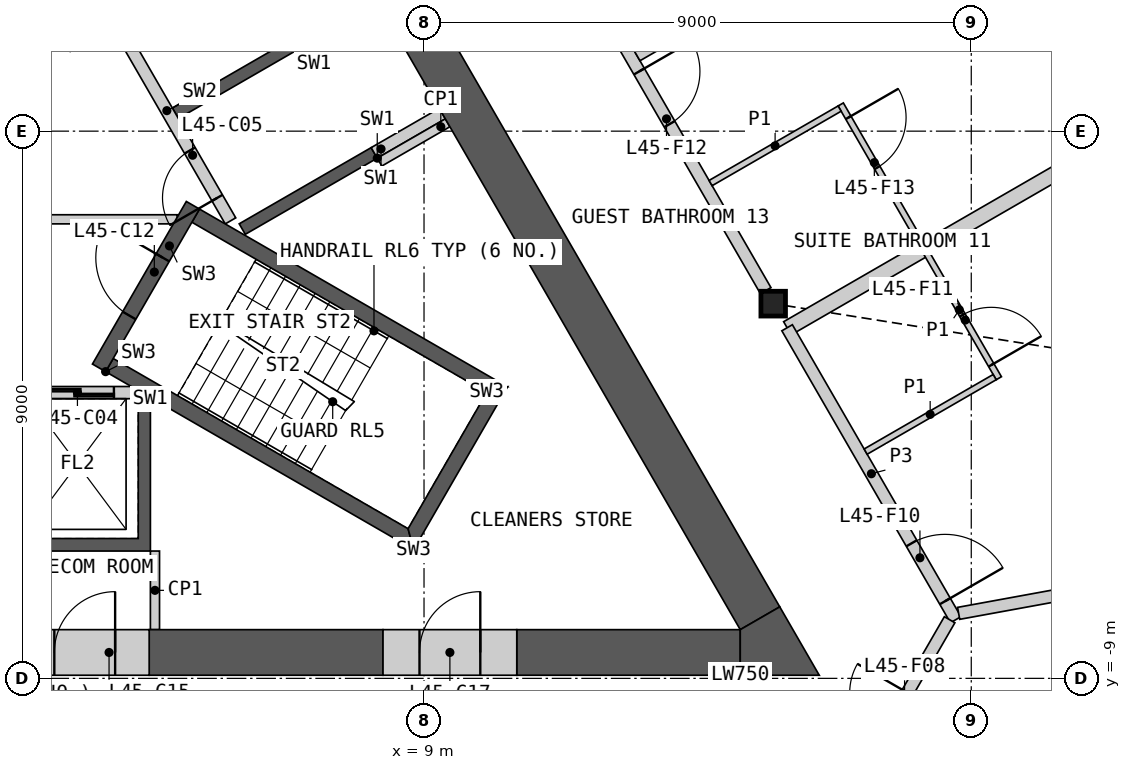
"""IFC4 building model, lengths in metres.
Left out: names, types, materials, properties, quantities, classifications, styles, units other than length and angle.
Written with IfcOpenShell. Run it as: python <this file> out.ifc"""

import sys

from ifc_helpers import new_model, si_unit, direction, frame, frame_2d, origin, origin_2d, place, context, subcontext, project, spatial, polyline, rectangle, i_section, outline, extrude, element, fill, save


model = new_model("IFC4")
c1 = context("Model", 3, precision=1e-05, world=origin(), true_north=direction((0.0, 1.0)))
c2 = subcontext(c1, "Body", "Model", "MODEL_VIEW")
j1 = project(units=[si_unit("LENGTHUNIT", "METRE"), si_unit("PLANEANGLEUNIT", "RADIAN")], contexts=[c1])
p1 = place(None, origin())
s1 = spatial("IfcSite", under=j1, at=p1, CompositionType="ELEMENT")
p2 = place(p1, origin())
s2 = spatial("IfcBuilding", under=s1, at=p2, CompositionType="ELEMENT")
p3 = place(p2, frame((0.0, 0.0, 205.2)))
s3 = spatial("IfcBuildingStorey", under=s2, at=p3, CompositionType="ELEMENT", Elevation=205.2)
p4 = place(p3, frame((14.743, -2.837, 0.0), z_axis=(0.0, 0.0, 1.0), x_axis=(1.0, 0.0, 0.0)))
e1 = element("IfcColumn", 1, at=p4, inside=s3, PredefinedType="COLUMN", context=c2, shape_type="SweptSolid", body=[
    extrude(i_section(OverallWidth=0.404, OverallDepth=0.407, WebThickness=0.027, FlangeThickness=0.044, at=origin_2d()), origin(), (0.0, 0.0, 1.0), 3.6),
])
p5 = place(p3, origin())
e2 = element("IfcWall", 2, at=p5, inside=s3, PredefinedType="SHEAR", context=c2, shape_type="SweptSolid", body=[
    extrude(outline(polyline([(4.5, -4.4), (4.5, -6.906), (2.1, -6.906), (2.1, -4.4), (2.3, -4.4), (2.3, -6.7), (4.3, -6.7), (4.3, -4.4), (4.5, -4.4)])), origin(), (0.0, 0.0, 1.0), 3.25),
])
p6 = place(p3, frame((-4.187, -4.3, 0.0), z_axis=(0.0, 0.0, 1.0), x_axis=(1.0, 0.0, 0.0)))
e3 = element("IfcWall", 3, at=p6, inside=s3, PredefinedType="SOLIDWALL", context=c2, shape_type="SweptSolid", body=[
    extrude(rectangle(XDim=8.373, YDim=0.2, at=frame_2d((4.187, 0.0))), origin(), (0.0, 0.0, 1.0), 3.25),
])
p7 = place(p6, frame((0.287, 0.0, 0.0)))
e4 = element("IfcOpeningElement", 4, at=p7, cuts=e3, PredefinedType="OPENING", context=c2, shape_type="SweptSolid", body=[
    extrude(rectangle(XDim=1.2, YDim=2.1, at=frame_2d((0.6, 1.05))), frame((0.0, 0.11, 0.0), z_axis=(0.0, -1.0, 0.0), x_axis=(1.0, 0.0, 0.0)), (0.0, 0.0, 1.0), 0.22),
])
p8 = place(p6, frame((2.387, 0.0, 0.0)))
e5 = element("IfcOpeningElement", 5, at=p8, cuts=e3, PredefinedType="OPENING", context=c2, shape_type="SweptSolid", body=[
    extrude(rectangle(XDim=1.4, YDim=2.1, at=frame_2d((0.7, 1.05))), frame((0.0, 0.11, 0.0), z_axis=(0.0, -1.0, 0.0), x_axis=(1.0, 0.0, 0.0)), (0.0, 0.0, 1.0), 0.22),
])
p9 = place(p6, frame((4.837, 0.0, 0.0)))
e6 = element("IfcOpeningElement", 6, at=p9, cuts=e3, PredefinedType="OPENING", context=c2, shape_type="SweptSolid", body=[
    extrude(rectangle(XDim=0.9, YDim=2.1, at=frame_2d((0.45, 1.05))), frame((0.0, 0.11, 0.0), z_axis=(0.0, -1.0, 0.0), x_axis=(1.0, 0.0, 0.0)), (0.0, 0.0, 1.0), 0.22),
])
p10 = place(p6, frame((6.887, 0.0, 0.0)))
e7 = element("IfcOpeningElement", 7, at=p10, cuts=e3, PredefinedType="OPENING", context=c2, shape_type="SweptSolid", body=[
    extrude(rectangle(XDim=1.2, YDim=2.1, at=frame_2d((0.6, 1.05))), frame((0.0, 0.11, 0.0), z_axis=(0.0, -1.0, 0.0), x_axis=(1.0, 0.0, 0.0)), (0.0, 0.0, 1.0), 0.22),
])
p11 = place(p3, origin())
e8 = element("IfcWall", 8, at=p11, inside=s3, PredefinedType="SHEAR", context=c2, shape_type="SweptSolid", body=[
    extrude(outline(polyline([(1.561, 6.097), (3.731, 7.35), (7.131, 1.461), (4.96, 0.208), (4.861, 0.381), (6.852, 1.531), (4.752, 5.169), (2.76, 4.019), (2.66, 4.192), (4.652, 5.342), (3.652, 7.074), (1.66, 5.924), (1.561, 6.097)])), origin(), (0.0, 0.0, 1.0), 3.25),
])
p12 = place(p3, origin())
e9 = element("IfcWall", 9, at=p12, inside=s3, PredefinedType="SHEAR", context=c2, shape_type="SweptSolid", body=[
    extrude(outline(polyline([(8.231, -0.444), (6.061, -1.697), (5.96, -1.524), (8.131, -0.271), (8.231, -0.444)])), origin(), (0.0, 0.0, 1.0), 3.25),
])
p13 = place(p3, frame((5.817, -1.476, 0.0), z_axis=(0.0, 0.0, 1.0), x_axis=(-0.500002616675, 0.866023893041, 0.0)))
e10 = element("IfcWall", 10, at=p13, inside=s3, PredefinedType="SOLIDWALL", context=c2, shape_type="SweptSolid", body=[
    extrude(rectangle(XDim=8.373, YDim=0.2, at=frame_2d((4.187, 0.0))), origin(), (0.0, 0.0, 1.0), 3.25),
])
p14 = place(p13, frame((0.437, 0.0, 0.0)))
e11 = element("IfcOpeningElement", 11, at=p14, cuts=e10, PredefinedType="OPENING", context=c2, shape_type="SweptSolid", body=[
    extrude(rectangle(XDim=0.9, YDim=2.1, at=frame_2d((0.45, 1.05))), frame((0.0, 0.11, 0.0), z_axis=(0.0, -1.0, 0.0), x_axis=(1.0, 0.0, 0.0)), (0.0, 0.0, 1.0), 0.22),
])
p15 = place(p13, frame((3.737, 0.0, 0.0)))
e12 = element("IfcOpeningElement", 12, at=p15, cuts=e10, PredefinedType="OPENING", context=c2, shape_type="SweptSolid", body=[
    extrude(rectangle(XDim=0.9, YDim=2.1, at=frame_2d((0.45, 1.05))), frame((0.0, 0.11, 0.0), z_axis=(0.0, -1.0, 0.0), x_axis=(1.0, 0.0, 0.0)), (0.0, 0.0, 1.0), 0.22),
])
p16 = place(p13, frame((6.937, 0.0, 0.0)))
e13 = element("IfcOpeningElement", 13, at=p16, cuts=e10, PredefinedType="OPENING", context=c2, shape_type="SweptSolid", body=[
    extrude(rectangle(XDim=1.1, YDim=2.1, at=frame_2d((0.55, 1.05))), frame((0.0, 0.11, 0.0), z_axis=(0.0, -1.0, 0.0), x_axis=(1.0, 0.0, 0.0)), (0.0, 0.0, 1.0), 0.22),
])
p17 = place(p3, frame((8.181, -0.357, 0.0), z_axis=(0.0, 0.0, 1.0), x_axis=(0.866003189247, 0.500038474733, 0.0)))
e14 = element("IfcWall", 14, at=p17, inside=s3, PredefinedType="SHEAR", context=c2, shape_type="SweptSolid", body=[
    extrude(rectangle(XDim=1.293, YDim=0.2, at=frame_2d((0.646, 0.0))), origin(), (0.0, 0.0, 1.0), 3.25),
])
p18 = place(p3, frame((-4.941, -1.45, 0.0), z_axis=(0.0, 0.0, 1.0), x_axis=(1.0, 0.0, 0.0)))
e15 = element("IfcWall", 15, at=p18, inside=s3, PredefinedType="PARTITIONING", context=c2, shape_type="SweptSolid", body=[
    extrude(rectangle(XDim=9.882, YDim=0.15, at=frame_2d((4.941, 0.0))), origin(), (0.0, 0.0, 1.0), 3.25),
])
p19 = place(p18, frame((4.391, 0.0, 0.0)))
e16 = element("IfcOpeningElement", 16, at=p19, cuts=e15, PredefinedType="OPENING", context=c2, shape_type="SweptSolid", body=[
    extrude(rectangle(XDim=1.1, YDim=2.1, at=frame_2d((0.55, 1.05))), frame((0.0, 0.085, 0.0), z_axis=(0.0, -1.0, 0.0), x_axis=(1.0, 0.0, 0.0)), (0.0, 0.0, 1.0), 0.17),
])
p20 = place(p3, origin())
e17 = element("IfcWall", 17, at=p20, inside=s3, PredefinedType="SHEAR", context=c2, shape_type="SweptSolid", body=[
    extrude(outline(polyline([(3.763, -3.956), (8.83, -6.881), (8.738, -6.539), (3.888, -3.739), (3.763, -3.956)])), origin(), (0.0, 0.0, 1.0), 3.25),
])
p21 = place(p3, origin())
e18 = element("IfcWall", 18, at=p21, inside=s3, PredefinedType="SHEAR", context=c2, shape_type="SweptSolid", body=[
    extrude(outline(polyline([(8.83, -6.881), (10.374, -4.206), (10.032, -4.298), (8.738, -6.539), (8.83, -6.881)])), origin(), (0.0, 0.0, 1.0), 3.25),
])
p22 = place(p3, origin())
e19 = element("IfcWall", 19, at=p22, inside=s3, PredefinedType="SHEAR", context=c2, shape_type="SweptSolid", body=[
    extrude(outline(polyline([(10.032, -4.298), (10.374, -4.206), (5.307, -1.281), (5.182, -1.498), (10.032, -4.298)])), origin(), (0.0, 0.0, 1.0), 3.25),
])
p23 = place(p3, frame((3.655, -3.893, 0.0), z_axis=(0.0, 0.0, 1.0), x_axis=(0.499982516597, 0.866035497597, 0.0)))
e20 = element("IfcWall", 20, at=p23, inside=s3, PredefinedType="SHEAR", context=c2, shape_type="SweptSolid", body=[
    extrude(rectangle(XDim=3.088, YDim=0.25, at=frame_2d((1.544, 0.0))), origin(), (0.0, 0.0, 1.0), 3.25),
])
p24 = place(p23, frame((0.994, 0.0, 0.0)))
e21 = element("IfcOpeningElement", 21, at=p24, cuts=e20, PredefinedType="OPENING", context=c2, shape_type="SweptSolid", body=[
    extrude(rectangle(XDim=1.1, YDim=2.1, at=frame_2d((0.55, 1.05))), frame((0.0, 0.135, 0.0), z_axis=(0.0, -1.0, 0.0), x_axis=(1.0, 0.0, 0.0)), (0.0, 0.0, 1.0), 0.27),
])
for number, where, z_axis, x_axis in (
    (22, (4.575, -6.906, 0.0), (0.0, 0.0, 1.0), (0.0, -1.0, 0.0)),
    (23, (8.268, -0.509, 0.0), (0.0, 0.0, 1.0), (0.866, 0.5, 0.0)),
):
    element("IfcWall", number, at=place(p3, frame(where, z_axis=z_axis, x_axis=x_axis)), inside=s3, PredefinedType="PARTITIONING", context=c2, shape_type="SweptSolid", body=[
        extrude(rectangle(XDim=1.293, YDim=0.15, at=frame_2d((0.646, 0.0))), origin(), (0.0, 0.0, 1.0), 3.25),
    ])
p25 = place(p3, frame((4.48, -8.574, 0.0), z_axis=(0.0, 0.0, 1.0), x_axis=(1.0, 0.0, 0.0)))
e24 = element("IfcWall", 24, at=p25, inside=s3, PredefinedType="SHEAR", context=c2, shape_type="SweptSolid", body=[
    extrude(rectangle(XDim=3.845, YDim=0.75, at=frame_2d((1.923, 0.0))), origin(), (0.0, 0.0, 1.0), 3.25),
])
p26 = place(p3, frame((10.525, -8.574, 0.0), z_axis=(0.0, 0.0, 1.0), x_axis=(1.0, 0.0, 0.0)))
e25 = element("IfcWall", 25, at=p26, inside=s3, PredefinedType="SHEAR", context=c2, shape_type="SweptSolid", body=[
    extrude(rectangle(XDim=3.676, YDim=0.75, at=frame_2d((1.838, 0.0))), origin(), (0.0, 0.0, 1.0), 3.25),
])
p27 = place(p3, frame((14.526, -8.011, 0.0), z_axis=(0.0, 0.0, 1.0), x_axis=(-0.499996012963, 0.866027705689, 0.0)))
e26 = element("IfcWall", 26, at=p27, inside=s3, PredefinedType="SHEAR", context=c2, shape_type="SweptSolid", body=[
    extrude(rectangle(XDim=15.039, YDim=0.75, at=frame_2d((7.519, 0.0))), origin(), (0.0, 0.0, 1.0), 3.25),
])
p28 = place(p3, origin())
e27 = element("IfcWall", 27, at=p28, inside=s3, PredefinedType="SHEAR", context=c2, shape_type="SweptSolid", body=[
    extrude(outline(polyline([(14.201, -8.949), (14.201, -8.199), (14.851, -7.824), (15.5, -8.949), (14.201, -8.949)])), origin(), (0.0, 0.0, 1.0), 3.25),
])
p29 = place(p3, frame((2.32, -8.574, 0.0), z_axis=(0.0, 0.0, 1.0), x_axis=(1.0, 0.0, 0.0)))
e28 = element("IfcWall", 28, at=p29, inside=s3, PredefinedType="SHEAR", context=c2, shape_type="SweptSolid", body=[
    extrude(rectangle(XDim=2.16, YDim=0.75, at=frame_2d((1.08, 0.0))), origin(), (0.0, 0.0, 1.0), 3.25),
])
p30 = place(p29, frame((0.6, 0.0, 0.0)))
e29 = element("IfcOpeningElement", 29, at=p30, cuts=e28, PredefinedType="OPENING", context=c2, shape_type="SweptSolid", body=[
    extrude(rectangle(XDim=1.0, YDim=2.1, at=frame_2d((0.5, 1.05))), frame((0.0, 0.385, 0.0), z_axis=(0.0, -1.0, 0.0), x_axis=(1.0, 0.0, 0.0)), (0.0, 0.0, 1.0), 0.77),
])
p31 = place(p3, frame((8.325, -8.574, 0.0), z_axis=(0.0, 0.0, 1.0), x_axis=(1.0, 0.0, 0.0)))
e30 = element("IfcWall", 30, at=p31, inside=s3, PredefinedType="SHEAR", context=c2, shape_type="SweptSolid", body=[
    extrude(rectangle(XDim=2.2, YDim=0.75, at=frame_2d((1.1, 0.0))), origin(), (0.0, 0.0, 1.0), 3.25),
])
p32 = place(p31, frame((0.6, 0.0, 0.0)))
e31 = element("IfcOpeningElement", 31, at=p32, cuts=e30, PredefinedType="OPENING", context=c2, shape_type="SweptSolid", body=[
    extrude(rectangle(XDim=1.0, YDim=2.1, at=frame_2d((0.5, 1.05))), frame((0.0, 0.385, 0.0), z_axis=(0.0, -1.0, 0.0), x_axis=(1.0, 0.0, 0.0)), (0.0, 0.0, 1.0), 0.77),
])
p33 = place(p3, frame((14.977, -3.242, 0.0), z_axis=(0.0, 0.0, 1.0), x_axis=(0.866026026416, 0.499998921569, 0.0)))
e32 = element("IfcWall", 32, at=p33, inside=s3, PredefinedType="PARTITIONING", context=c2, shape_type="SweptSolid", body=[
    extrude(rectangle(XDim=12.918, YDim=0.25, at=frame_2d((6.459, 0.0))), origin(), (0.0, 0.0, 1.0), 2.404),
])
p34 = place(p3, frame((9.952, 5.461, 0.0), z_axis=(0.0, 0.0, 1.0), x_axis=(0.50000393355, -0.866023132736, 0.0)))
e33 = element("IfcWall", 33, at=p34, inside=s3, PredefinedType="PARTITIONING", context=c2, shape_type="SweptSolid", body=[
    extrude(rectangle(XDim=9.335, YDim=0.2, at=frame_2d((4.667, 0.0))), origin(), (0.0, 0.0, 1.0), 3.25),
])
p35 = place(p34, frame((5.172, 0.0, 0.0)))
e34 = element("IfcOpeningElement", 34, at=p35, cuts=e33, PredefinedType="OPENING", context=c2, shape_type="SweptSolid", body=[
    extrude(rectangle(XDim=1.0, YDim=2.1, at=frame_2d((0.5, 1.05))), frame((0.0, 0.11, 0.0), z_axis=(0.0, -1.0, 0.0), x_axis=(1.0, 0.0, 0.0)), (0.0, 0.0, 1.0), 0.22),
])
p36 = place(p34, frame((3.565, 0.0, 0.0)))
e35 = element("IfcOpeningElement", 35, at=p36, cuts=e33, PredefinedType="OPENING", context=c2, shape_type="SweptSolid", body=[
    extrude(rectangle(XDim=1.0, YDim=2.1, at=frame_2d((0.5, 1.05))), frame((0.0, 0.11, 0.0), z_axis=(0.0, -1.0, 0.0), x_axis=(1.0, 0.0, 0.0)), (0.0, 0.0, 1.0), 0.22),
])
p37 = place(p3, frame((12.489, 1.266, 0.0), z_axis=(0.0, 0.0, 1.0), x_axis=(0.866026623601, 0.49999788721, 0.0)))
e36 = element("IfcWall", 36, at=p37, inside=s3, PredefinedType="PARTITIONING", context=c2, shape_type="SweptSolid", body=[
    extrude(rectangle(XDim=8.159, YDim=0.25, at=frame_2d((4.079, 0.0))), origin(), (0.0, 0.0, 1.0), 2.404),
])
p38 = place(p3, frame((14.971, -3.233, 0.0), z_axis=(0.0, 0.0, 1.0), x_axis=(0.500003221507, -0.866023543838, 0.0)))
e37 = element("IfcWall", 37, at=p38, inside=s3, PredefinedType="PARTITIONING", context=c2, shape_type="SweptSolid", body=[
    extrude(rectangle(XDim=5.545, YDim=0.2, at=frame_2d((2.772, 0.0))), origin(), (0.0, 0.0, 1.0), 3.25),
])
p39 = place(p38, frame((4.094, 0.0, 0.0)))
e38 = element("IfcOpeningElement", 38, at=p39, cuts=e37, PredefinedType="OPENING", context=c2, shape_type="SweptSolid", body=[
    extrude(rectangle(XDim=1.1, YDim=2.1, at=frame_2d((0.55, 1.05))), frame((0.0, 0.11, 0.0), z_axis=(0.0, -1.0, 0.0), x_axis=(1.0, 0.0, 0.0)), (0.0, 0.0, 1.0), 0.22),
])
p40 = place(p3, frame((15.731, -11.349, 0.0), z_axis=(0.0, 0.0, 1.0), x_axis=(0.499961815444, 0.866047448526, 0.0)))
e39 = element("IfcWall", 39, at=p40, inside=s3, PredefinedType="PARTITIONING", context=c2, shape_type="SweptSolid", body=[
    extrude(rectangle(XDim=3.826, YDim=0.2, at=frame_2d((1.913, 0.0))), origin(), (0.0, 0.0, 1.0), 3.25),
])
p41 = place(p40, frame((1.49, 0.0, 0.0)))
e40 = element("IfcOpeningElement", 40, at=p41, cuts=e39, PredefinedType="OPENING", context=c2, shape_type="SweptSolid", body=[
    extrude(rectangle(XDim=0.95, YDim=2.1, at=frame_2d((0.475, 1.05))), frame((0.0, 0.11, 0.0), z_axis=(0.0, -1.0, 0.0), x_axis=(1.0, 0.0, 0.0)), (0.0, 0.0, 1.0), 0.22),
])
p42 = place(p3, frame((17.792, -7.931, 0.0), z_axis=(0.0, 0.0, 1.0), x_axis=(0.983720538919, 0.179705039744, 0.0)))
e41 = element("IfcWall", 41, at=p42, inside=s3, PredefinedType="PARTITIONING", context=c2, shape_type="SweptSolid", body=[
    extrude(rectangle(XDim=13.761, YDim=0.2, at=frame_2d((6.88, 0.0))), origin(), (0.0, 0.0, 1.0), 2.404),
])
p43 = place(p3, frame((15.853, 0.439, 0.0), z_axis=(0.0, 0.0, 1.0), x_axis=(0.499971721724, -0.866041729639, 0.0)))
e42 = element("IfcWall", 42, at=p43, inside=s3, PredefinedType="PARTITIONING", context=c2, shape_type="SweptSolid", body=[
    extrude(rectangle(XDim=5.2, YDim=0.1, at=frame_2d((2.6, 0.0))), origin(), (0.0, 0.0, 1.0), 2.404),
])
p44 = place(p43, frame((4.0, 0.0, 0.0)))
e43 = element("IfcOpeningElement", 43, at=p44, cuts=e42, PredefinedType="OPENING", context=c2, shape_type="SweptSolid", body=[
    extrude(rectangle(XDim=0.95, YDim=2.1, at=frame_2d((0.475, 1.05))), frame((0.0, 0.06, 0.0), z_axis=(0.0, -1.0, 0.0), x_axis=(1.0, 0.0, 0.0)), (0.0, 0.0, 1.0), 0.12),
])
p45 = place(p43, frame((0.25, 0.0, 0.0)))
e44 = element("IfcOpeningElement", 44, at=p45, cuts=e42, PredefinedType="OPENING", context=c2, shape_type="SweptSolid", body=[
    extrude(rectangle(XDim=0.95, YDim=2.1, at=frame_2d((0.475, 1.05))), frame((0.0, 0.06, 0.0), z_axis=(0.0, -1.0, 0.0), x_axis=(1.0, 0.0, 0.0)), (0.0, 0.0, 1.0), 0.12),
])
p46 = place(p3, frame((13.713, -0.854, 0.0), z_axis=(0.0, 0.0, 1.0), x_axis=(0.866014668023, 0.500018594424, 0.0)))
e45 = element("IfcWall", 45, at=p46, inside=s3, PredefinedType="PARTITIONING", context=c2, shape_type="SweptSolid", body=[
    extrude(rectangle(XDim=2.45, YDim=0.1, at=frame_2d((1.225, 0.0))), origin(), (0.0, 0.0, 1.0), 2.404),
])
p47 = place(p3, frame((16.263, -5.271, 0.0), z_axis=(0.0, 0.0, 1.0), x_axis=(0.866057815567, 0.499943856944, 0.0)))
e46 = element("IfcWall", 46, at=p47, inside=s3, PredefinedType="PARTITIONING", context=c2, shape_type="SweptSolid", body=[
    extrude(rectangle(XDim=2.45, YDim=0.1, at=frame_2d((1.225, 0.0))), origin(), (0.0, 0.0, 1.0), 2.404),
])
p48 = place(p10, origin())
e47 = element("IfcDoor", 47, at=p48, inside=s3, OperationType="SLIDING_TO_LEFT", PredefinedType="DOOR", context=c2, shape_type="SweptSolid", body=[
    extrude(rectangle(XDim=1.2, YDim=2.1, at=frame_2d((0.6, 1.05))), frame((0.0, 0.025, 0.0), z_axis=(0.0, -1.0, 0.0), x_axis=(1.0, 0.0, 0.0)), (0.0, 0.0, 1.0), 0.05),
])
fill(e7, e47)
p49 = place(p14, origin())
e48 = element("IfcDoor", 48, at=p49, inside=s3, OperationType="SINGLE_SWING_LEFT", PredefinedType="DOOR", context=c2, shape_type="SweptSolid", body=[
    extrude(rectangle(XDim=0.9, YDim=2.1, at=frame_2d((0.45, 1.05))), frame((0.0, 0.025, 0.0), z_axis=(0.0, -1.0, 0.0), x_axis=(1.0, 0.0, 0.0)), (0.0, 0.0, 1.0), 0.05),
])
fill(e11, e48)
p50 = place(p24, origin())
e49 = element("IfcDoor", 49, at=p50, inside=s3, OperationType="SINGLE_SWING_RIGHT", PredefinedType="DOOR", context=c2, shape_type="SweptSolid", body=[
    extrude(rectangle(XDim=1.1, YDim=2.1, at=frame_2d((0.55, 1.05))), frame((0.0, 0.025, 0.0), z_axis=(0.0, -1.0, 0.0), x_axis=(1.0, 0.0, 0.0)), (0.0, 0.0, 1.0), 0.05),
])
fill(e21, e49)
p51 = place(p30, origin())
e50 = element("IfcDoor", 50, at=p51, inside=s3, OperationType="SINGLE_SWING_RIGHT", PredefinedType="DOOR", context=c2, shape_type="SweptSolid", body=[
    extrude(rectangle(XDim=1.0, YDim=2.1, at=frame_2d((0.5, 1.05))), frame((0.0, 0.13, 0.0), z_axis=(0.0, -1.0, 0.0), x_axis=(1.0, 0.0, 0.0)), (0.0, 0.0, 1.0), 0.05),
])
fill(e29, e50)
p52 = place(p32, origin())
e51 = element("IfcDoor", 51, at=p52, inside=s3, OperationType="SINGLE_SWING_RIGHT", PredefinedType="DOOR", context=c2, shape_type="SweptSolid", body=[
    extrude(rectangle(XDim=1.0, YDim=2.1, at=frame_2d((0.5, 1.05))), frame((0.0, 0.13, 0.0), z_axis=(0.0, -1.0, 0.0), x_axis=(1.0, 0.0, 0.0)), (0.0, 0.0, 1.0), 0.05),
])
fill(e31, e51)
p53 = place(p39, origin())
e52 = element("IfcDoor", 52, at=p53, inside=s3, OperationType="SINGLE_SWING_RIGHT", PredefinedType="DOOR", context=c2, shape_type="SweptSolid", body=[
    extrude(rectangle(XDim=1.1, YDim=2.1, at=frame_2d((0.55, 1.05))), frame((0.0, 0.025, 0.0), z_axis=(0.0, -1.0, 0.0), x_axis=(1.0, 0.0, 0.0)), (0.0, 0.0, 1.0), 0.05),
])
fill(e38, e52)
p54 = place(p44, origin())
e53 = element("IfcDoor", 53, at=p54, inside=s3, OperationType="SINGLE_SWING_RIGHT", PredefinedType="DOOR", context=c2, shape_type="SweptSolid", body=[
    extrude(rectangle(XDim=0.95, YDim=2.1, at=frame_2d((0.475, 1.05))), frame((0.0, 0.025, 0.0), z_axis=(0.0, -1.0, 0.0), x_axis=(1.0, 0.0, 0.0)), (0.0, 0.0, 1.0), 0.05),
])
fill(e43, e53)
p55 = place(p35, origin())
e54 = element("IfcDoor", 54, at=p55, inside=s3, OperationType="SINGLE_SWING_LEFT", PredefinedType="DOOR", context=c2, shape_type="SweptSolid", body=[
    extrude(rectangle(XDim=1.0, YDim=2.1, at=frame_2d((0.5, 1.05))), frame((0.0, 0.025, 0.0), z_axis=(0.0, -1.0, 0.0), x_axis=(1.0, 0.0, 0.0)), (0.0, 0.0, 1.0), 0.05),
])
fill(e34, e54)
p56 = place(p45, origin())
e55 = element("IfcDoor", 55, at=p56, inside=s3, OperationType="SINGLE_SWING_LEFT", PredefinedType="DOOR", context=c2, shape_type="SweptSolid", body=[
    extrude(rectangle(XDim=0.95, YDim=2.1, at=frame_2d((0.475, 1.05))), frame((0.0, 0.025, 0.0), z_axis=(0.0, -1.0, 0.0), x_axis=(1.0, 0.0, 0.0)), (0.0, 0.0, 1.0), 0.05),
])
fill(e44, e55)
save(model, sys.argv[1])
